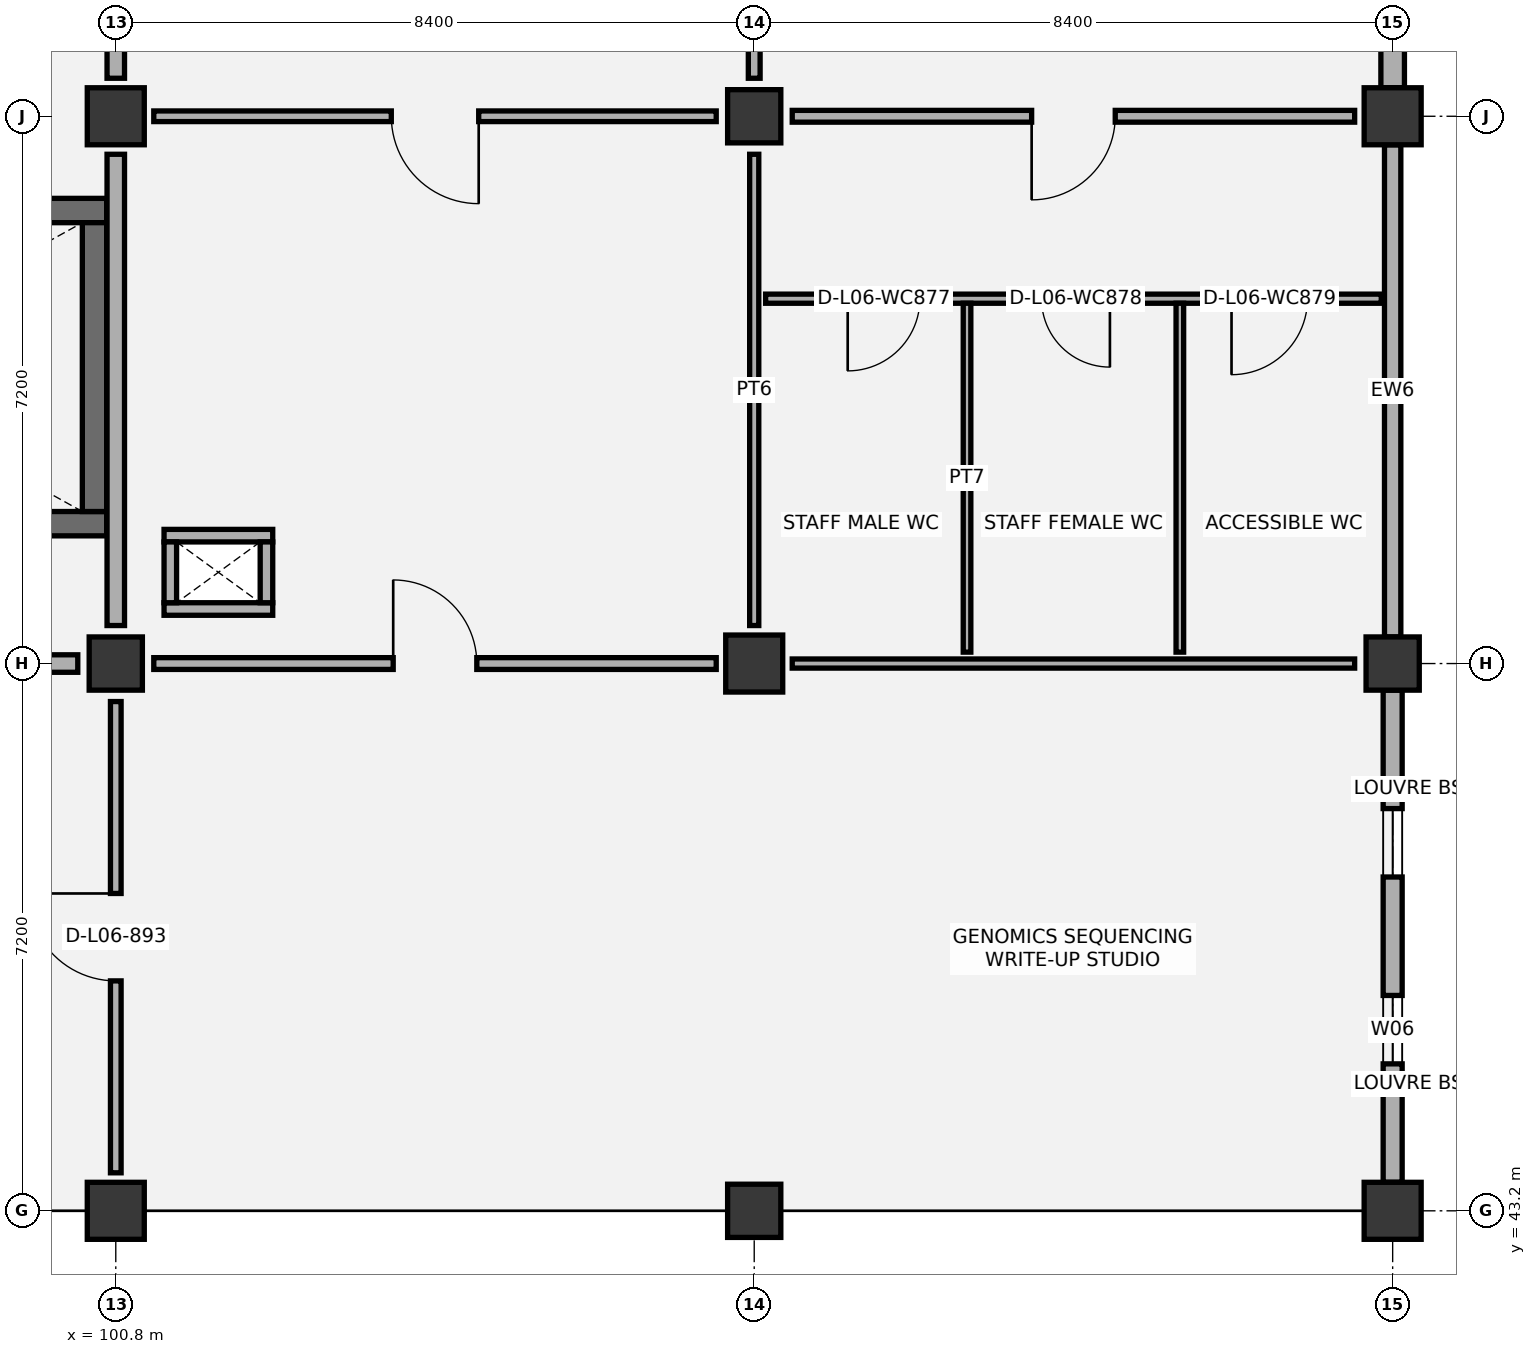
"""IFC4 building model, lengths in metres.
Left out: names, types, materials, properties, quantities, classifications, styles, units other than length and angle.
Written with IfcOpenShell. Run it as: python <this file> out.ifc"""

import sys

from ifc_helpers import new_model, si_unit, direction, frame, frame_2d, origin, origin_2d, place, context, subcontext, project, spatial, rectangle, extrude, element, fill, save


model = new_model("IFC4")
c1 = context("Model", 3, precision=1e-05, world=origin(), true_north=direction((0.0, 1.0)))
c2 = subcontext(c1, "Body", "Model", "MODEL_VIEW")
j1 = project(units=[si_unit("LENGTHUNIT", "METRE"), si_unit("PLANEANGLEUNIT", "RADIAN")], contexts=[c1])
p1 = place(None, origin())
s1 = spatial("IfcSite", under=j1, at=p1, CompositionType="ELEMENT")
p2 = place(p1, origin())
s2 = spatial("IfcBuilding", under=s1, at=p2, CompositionType="ELEMENT")
p3 = place(p2, frame((0.0, 0.0, 31.2)))
s3 = spatial("IfcBuildingStorey", under=s2, at=p3, CompositionType="ELEMENT", Elevation=31.2)
p4 = place(p3, frame((100.8, 43.2, 0.0), z_axis=(0.0, 0.0, 1.0), x_axis=(1.0, 0.0, 0.0)))
e1 = element("IfcColumn", 1, at=p4, inside=s3, PredefinedType="COLUMN", context=c2, shape_type="SweptSolid", body=[
    extrude(rectangle(XDim=0.75, YDim=0.75, at=origin_2d()), origin(), (0.0, 0.0, 1.0), 4.2),
])
p5 = place(p3, frame((100.8, 50.4, 0.0), z_axis=(0.0, 0.0, 1.0), x_axis=(1.0, 0.0, 0.0)))
e2 = element("IfcColumn", 2, at=p5, inside=s3, PredefinedType="COLUMN", context=c2, shape_type="SweptSolid", body=[
    extrude(rectangle(XDim=0.7, YDim=0.7, at=origin_2d()), origin(), (0.0, 0.0, 1.0), 4.2),
])
p6 = place(p3, frame((100.8, 57.6, 0.0), z_axis=(0.0, 0.0, 1.0), x_axis=(1.0, 0.0, 0.0)))
e3 = element("IfcColumn", 3, at=p6, inside=s3, PredefinedType="COLUMN", context=c2, shape_type="SweptSolid", body=[
    extrude(rectangle(XDim=0.75, YDim=0.75, at=origin_2d()), origin(), (0.0, 0.0, 1.0), 4.2),
])
p7 = place(p3, frame((109.2, 43.2, 0.0), z_axis=(0.0, 0.0, 1.0), x_axis=(1.0, 0.0, 0.0)))
e4 = element("IfcColumn", 4, at=p7, inside=s3, PredefinedType="COLUMN", context=c2, shape_type="SweptSolid", body=[
    extrude(rectangle(XDim=0.7, YDim=0.7, at=origin_2d()), origin(), (0.0, 0.0, 1.0), 4.2),
])
p8 = place(p3, frame((109.2, 50.4, 0.0), z_axis=(0.0, 0.0, 1.0), x_axis=(1.0, 0.0, 0.0)))
e5 = element("IfcColumn", 5, at=p8, inside=s3, PredefinedType="COLUMN", context=c2, shape_type="SweptSolid", body=[
    extrude(rectangle(XDim=0.75, YDim=0.75, at=origin_2d()), origin(), (0.0, 0.0, 1.0), 4.2),
])
p9 = place(p3, frame((109.2, 57.6, 0.0), z_axis=(0.0, 0.0, 1.0), x_axis=(1.0, 0.0, 0.0)))
e6 = element("IfcColumn", 6, at=p9, inside=s3, PredefinedType="COLUMN", context=c2, shape_type="SweptSolid", body=[
    extrude(rectangle(XDim=0.7, YDim=0.7, at=origin_2d()), origin(), (0.0, 0.0, 1.0), 4.2),
])
p10 = place(p3, frame((117.6, 43.2, 0.0), z_axis=(0.0, 0.0, 1.0), x_axis=(1.0, 0.0, 0.0)))
e7 = element("IfcColumn", 7, at=p10, inside=s3, PredefinedType="COLUMN", context=c2, shape_type="SweptSolid", body=[
    extrude(rectangle(XDim=0.75, YDim=0.75, at=origin_2d()), origin(), (0.0, 0.0, 1.0), 4.2),
])
p11 = place(p3, frame((117.6, 50.4, 0.0), z_axis=(0.0, 0.0, 1.0), x_axis=(1.0, 0.0, 0.0)))
e8 = element("IfcColumn", 8, at=p11, inside=s3, PredefinedType="COLUMN", context=c2, shape_type="SweptSolid", body=[
    extrude(rectangle(XDim=0.7, YDim=0.7, at=origin_2d()), origin(), (0.0, 0.0, 1.0), 4.2),
])
p12 = place(p3, frame((117.6, 57.6, 0.0), z_axis=(0.0, 0.0, 1.0), x_axis=(1.0, 0.0, 0.0)))
e9 = element("IfcColumn", 9, at=p12, inside=s3, PredefinedType="COLUMN", context=c2, shape_type="SweptSolid", body=[
    extrude(rectangle(XDim=0.75, YDim=0.75, at=origin_2d()), origin(), (0.0, 0.0, 1.0), 4.2),
])
p13 = place(p3, frame((93.2, 52.24, 0.0), z_axis=(0.0, 0.0, 1.0), x_axis=(1.0, 0.0, 0.0)))
e10 = element("IfcWall", 10, at=p13, inside=s3, PredefinedType="SHEAR", context=c2, shape_type="SweptSolid", body=[
    extrude(rectangle(XDim=7.48, YDim=0.32, at=frame_2d((3.74, 0.0))), origin(), (0.0, 0.0, 1.0), 3.92),
])
p14 = place(p13, frame((0.45, 0.0, 0.0)))
e11 = element("IfcOpeningElement", 11, at=p14, cuts=e10, PredefinedType="OPENING", context=c2, shape_type="SweptSolid", body=[
    extrude(rectangle(XDim=1.05, YDim=2.15, at=frame_2d((0.525, 1.075))), frame((0.0, 0.17, 0.0), z_axis=(0.0, -1.0, 0.0), x_axis=(1.0, 0.0, 0.0)), (0.0, 0.0, 1.0), 0.34),
])
p15 = place(p3, frame((93.2, 56.36, 0.0), z_axis=(0.0, 0.0, 1.0), x_axis=(1.0, 0.0, 0.0)))
e12 = element("IfcWall", 12, at=p15, inside=s3, PredefinedType="SHEAR", context=c2, shape_type="SweptSolid", body=[
    extrude(rectangle(XDim=7.48, YDim=0.32, at=frame_2d((3.74, 0.0))), origin(), (0.0, 0.0, 1.0), 3.92),
])
p16 = place(p3, frame((100.52, 52.4, 0.0), z_axis=(0.0, 0.0, 1.0), x_axis=(0.0, 1.0, 0.0)))
e13 = element("IfcWall", 13, at=p16, inside=s3, PredefinedType="SHEAR", context=c2, shape_type="SweptSolid", body=[
    extrude(rectangle(XDim=3.8, YDim=0.32, at=frame_2d((1.9, 0.0))), origin(), (0.0, 0.0, 1.0), 3.92),
])
p17 = place(p3, frame((117.6, 43.575, 0.0), z_axis=(0.0, 0.0, 1.0), x_axis=(0.0, 1.0, 0.0)))
e14 = element("IfcWall", 14, at=p17, inside=s3, PredefinedType="SOLIDWALL", context=c2, shape_type="SweptSolid", body=[
    extrude(rectangle(XDim=6.475, YDim=0.25, at=frame_2d((3.238, 0.0))), origin(), (0.0, 0.0, 1.0), 3.445),
])
p18 = place(p17, frame((1.558, 0.0, 0.9)))
e15 = element("IfcOpeningElement", 15, at=p18, cuts=e14, PredefinedType="OPENING", context=c2, shape_type="SweptSolid", body=[
    extrude(rectangle(XDim=0.9, YDim=1.8, at=frame_2d((0.45, 0.9))), frame((0.0, 0.135, 0.0), z_axis=(0.0, -1.0, 0.0), x_axis=(1.0, 0.0, 0.0)), (0.0, 0.0, 1.0), 0.27),
])
p19 = place(p17, frame((4.017, 0.0, 0.9)))
e16 = element("IfcOpeningElement", 16, at=p19, cuts=e14, PredefinedType="OPENING", context=c2, shape_type="SweptSolid", body=[
    extrude(rectangle(XDim=0.9, YDim=1.8, at=frame_2d((0.45, 0.9))), frame((0.0, 0.135, 0.0), z_axis=(0.0, -1.0, 0.0), x_axis=(1.0, 0.0, 0.0)), (0.0, 0.0, 1.0), 0.27),
])
p20 = place(p3, frame((117.6, 50.75, 0.0), z_axis=(0.0, 0.0, 1.0), x_axis=(0.0, 1.0, 0.0)))
e17 = element("IfcWall", 17, at=p20, inside=s3, PredefinedType="SOLIDWALL", context=c2, shape_type="SweptSolid", body=[
    extrude(rectangle(XDim=6.475, YDim=0.215, at=frame_2d((3.238, 0.0))), origin(), (0.0, 0.0, 1.0), 3.365),
])
p21 = place(p3, frame((117.6, 57.975, 0.0), z_axis=(0.0, 0.0, 1.0), x_axis=(0.0, 1.0, 0.0)))
e18 = element("IfcWall", 18, at=p21, inside=s3, PredefinedType="SOLIDWALL", context=c2, shape_type="SweptSolid", body=[
    extrude(rectangle(XDim=6.475, YDim=0.31, at=frame_2d((3.237, 0.0))), origin(), (0.0, 0.0, 1.0), 3.365),
])
p22 = place(p21, frame((0.858, 0.0, 0.9)))
e19 = element("IfcOpeningElement", 19, at=p22, cuts=e18, PredefinedType="OPENING", context=c2, shape_type="SweptSolid", body=[
    extrude(rectangle(XDim=1.95, YDim=1.95, at=frame_2d((0.975, 0.975))), frame((0.0, 0.165, 0.0), z_axis=(0.0, -1.0, 0.0), x_axis=(1.0, 0.0, 0.0)), (0.0, 0.0, 1.0), 0.33),
])
p23 = place(p21, frame((3.667, 0.0, 0.9)))
e20 = element("IfcOpeningElement", 20, at=p23, cuts=e18, PredefinedType="OPENING", context=c2, shape_type="SweptSolid", body=[
    extrude(rectangle(XDim=1.95, YDim=1.95, at=frame_2d((0.975, 0.975))), frame((0.0, 0.165, 0.0), z_axis=(0.0, -1.0, 0.0), x_axis=(1.0, 0.0, 0.0)), (0.0, 0.0, 1.0), 0.33),
])
for number, where, z_axis, x_axis in (
    (21, (101.435, 51.117, 0.0), (0.0, 0.0, 1.0), (1.0, 0.0, 0.0)),
    (22, (101.435, 52.083, 0.0), (0.0, 0.0, 1.0), (1.0, 0.0, 0.0)),
):
    element("IfcWall", number, at=place(p3, frame(where, z_axis=z_axis, x_axis=x_axis)), inside=s3, PredefinedType="PARTITIONING", context=c2, shape_type="SweptSolid", body=[
        extrude(rectangle(XDim=1.43, YDim=0.165, at=frame_2d((0.715, 0.0))), origin(), (0.0, 0.0, 1.0), 3.92),
    ])
for number, where, z_axis, x_axis in (
    (23, (101.518, 51.2, 0.0), (0.0, 0.0, 1.0), (0.0, 1.0, 0.0)),
    (24, (102.782, 51.2, 0.0), (0.0, 0.0, 1.0), (0.0, 1.0, 0.0)),
):
    element("IfcWall", number, at=place(p3, frame(where, z_axis=z_axis, x_axis=x_axis)), inside=s3, PredefinedType="PARTITIONING", context=c2, shape_type="SweptSolid", body=[
        extrude(rectangle(XDim=0.8, YDim=0.165, at=frame_2d((0.4, 0.0))), origin(), (0.0, 0.0, 1.0), 3.92),
    ])
p24 = place(p3, frame((109.35, 55.2, 0.0), z_axis=(0.0, 0.0, 1.0), x_axis=(1.0, 0.0, 0.0)))
e25 = element("IfcWall", 25, at=p24, inside=s3, PredefinedType="PARTITIONING", context=c2, shape_type="SweptSolid", body=[
    extrude(rectangle(XDim=8.1, YDim=0.12, at=frame_2d((4.05, 0.0))), origin(), (0.0, 0.0, 1.0), 3.92),
])
p25 = place(p24, frame((1.08, 0.0, 0.0)))
e26 = element("IfcOpeningElement", 26, at=p25, cuts=e25, PredefinedType="OPENING", context=c2, shape_type="SweptSolid", body=[
    extrude(rectangle(XDim=0.95, YDim=2.1, at=frame_2d((0.475, 1.05))), frame((0.0, 0.07, 0.0), z_axis=(0.0, -1.0, 0.0), x_axis=(1.0, 0.0, 0.0)), (0.0, 0.0, 1.0), 0.14),
])
p26 = place(p24, frame((3.63, 0.0, 0.0)))
e27 = element("IfcOpeningElement", 27, at=p26, cuts=e25, PredefinedType="OPENING", context=c2, shape_type="SweptSolid", body=[
    extrude(rectangle(XDim=0.9, YDim=2.1, at=frame_2d((0.45, 1.05))), frame((0.0, 0.07, 0.0), z_axis=(0.0, -1.0, 0.0), x_axis=(1.0, 0.0, 0.0)), (0.0, 0.0, 1.0), 0.14),
])
p27 = place(p24, frame((6.13, 0.0, 0.0)))
e28 = element("IfcOpeningElement", 28, at=p27, cuts=e25, PredefinedType="OPENING", context=c2, shape_type="SweptSolid", body=[
    extrude(rectangle(XDim=1.0, YDim=2.1, at=frame_2d((0.5, 1.05))), frame((0.0, 0.07, 0.0), z_axis=(0.0, -1.0, 0.0), x_axis=(1.0, 0.0, 0.0)), (0.0, 0.0, 1.0), 0.14),
])
for number, where, z_axis, x_axis in (
    (29, (112.0, 50.55, 0.0), (0.0, 0.0, 1.0), (0.0, 1.0, 0.0)),
    (30, (114.8, 50.55, 0.0), (0.0, 0.0, 1.0), (0.0, 1.0, 0.0)),
):
    element("IfcWall", number, at=place(p3, frame(where, z_axis=z_axis, x_axis=x_axis)), inside=s3, PredefinedType="PARTITIONING", context=c2, shape_type="SweptSolid", body=[
        extrude(rectangle(XDim=4.59, YDim=0.1, at=frame_2d((2.295, 0.0))), origin(), (0.0, 0.0, 1.0), 3.92),
    ])
p28 = place(p3, frame((100.8, 43.7, 0.0), z_axis=(0.0, 0.0, 1.0), x_axis=(0.0, 1.0, 0.0)))
e31 = element("IfcWall", 31, at=p28, inside=s3, PredefinedType="PARTITIONING", context=c2, shape_type="SweptSolid", body=[
    extrude(rectangle(XDim=6.2, YDim=0.14, at=frame_2d((3.1, 0.0))), origin(), (0.0, 0.0, 1.0), 3.515),
])
p29 = place(p28, frame((2.525, 0.0, 0.0)))
e32 = element("IfcOpeningElement", 32, at=p29, cuts=e31, PredefinedType="OPENING", context=c2, shape_type="SweptSolid", body=[
    extrude(rectangle(XDim=1.15, YDim=2.1, at=frame_2d((0.575, 1.05))), frame((0.0, 0.08, 0.0), z_axis=(0.0, -1.0, 0.0), x_axis=(1.0, 0.0, 0.0)), (0.0, 0.0, 1.0), 0.16),
])
p30 = place(p3, frame((92.9, 50.4, 0.0), z_axis=(0.0, 0.0, 1.0), x_axis=(1.0, 0.0, 0.0)))
e33 = element("IfcWall", 33, at=p30, inside=s3, PredefinedType="PARTITIONING", context=c2, shape_type="SweptSolid", body=[
    extrude(rectangle(XDim=7.4, YDim=0.23, at=frame_2d((3.7, 0.0))), origin(), (0.0, 0.0, 1.0), 3.265),
])
p31 = place(p30, frame((2.95, 0.0, 0.0)))
e34 = element("IfcOpeningElement", 34, at=p31, cuts=e33, PredefinedType="OPENING", context=c2, shape_type="SweptSolid", body=[
    extrude(rectangle(XDim=1.5, YDim=2.15, at=frame_2d((0.75, 1.075))), frame((0.0, 0.125, 0.0), z_axis=(0.0, -1.0, 0.0), x_axis=(1.0, 0.0, 0.0)), (0.0, 0.0, 1.0), 0.25),
])
p32 = place(p3, frame((100.8, 50.9, 0.0), z_axis=(0.0, 0.0, 1.0), x_axis=(0.0, 1.0, 0.0)))
e35 = element("IfcWall", 35, at=p32, inside=s3, PredefinedType="PARTITIONING", context=c2, shape_type="SweptSolid", body=[
    extrude(rectangle(XDim=6.2, YDim=0.23, at=frame_2d((3.1, 0.0))), origin(), (0.0, 0.0, 1.0), 3.315),
])
p33 = place(p3, frame((100.8, 58.1, 0.0), z_axis=(0.0, 0.0, 1.0), x_axis=(0.0, 1.0, 0.0)))
e36 = element("IfcWall", 36, at=p33, inside=s3, PredefinedType="PARTITIONING", context=c2, shape_type="SweptSolid", body=[
    extrude(rectangle(XDim=6.2, YDim=0.23, at=frame_2d((3.1, 0.0))), origin(), (0.0, 0.0, 1.0), 3.625),
])
p34 = place(p3, frame((101.3, 50.4, 0.0), z_axis=(0.0, 0.0, 1.0), x_axis=(1.0, 0.0, 0.0)))
e37 = element("IfcWall", 37, at=p34, inside=s3, PredefinedType="PARTITIONING", context=c2, shape_type="SweptSolid", body=[
    extrude(rectangle(XDim=7.4, YDim=0.155, at=frame_2d((3.7, 0.0))), origin(), (0.0, 0.0, 1.0), 3.265),
])
p35 = place(p34, frame((3.15, 0.0, 0.0)))
e38 = element("IfcOpeningElement", 38, at=p35, cuts=e37, PredefinedType="OPENING", context=c2, shape_type="SweptSolid", body=[
    extrude(rectangle(XDim=1.1, YDim=2.1, at=frame_2d((0.55, 1.05))), frame((0.0, 0.087, 0.0), z_axis=(0.0, -1.0, 0.0), x_axis=(1.0, 0.0, 0.0)), (0.0, 0.0, 1.0), 0.175),
])
p36 = place(p3, frame((109.2, 50.9, 0.0), z_axis=(0.0, 0.0, 1.0), x_axis=(0.0, 1.0, 0.0)))
e39 = element("IfcWall", 39, at=p36, inside=s3, PredefinedType="PARTITIONING", context=c2, shape_type="SweptSolid", body=[
    extrude(rectangle(XDim=6.2, YDim=0.12, at=frame_2d((3.1, 0.0))), origin(), (0.0, 0.0, 1.0), 3.625),
])
p37 = place(p3, frame((101.3, 57.6, 0.0), z_axis=(0.0, 0.0, 1.0), x_axis=(1.0, 0.0, 0.0)))
e40 = element("IfcWall", 40, at=p37, inside=s3, PredefinedType="PARTITIONING", context=c2, shape_type="SweptSolid", body=[
    extrude(rectangle(XDim=7.4, YDim=0.14, at=frame_2d((3.7, 0.0))), origin(), (0.0, 0.0, 1.0), 3.265),
])
p38 = place(p37, frame((3.125, 0.0, 0.0)))
e41 = element("IfcOpeningElement", 41, at=p38, cuts=e40, PredefinedType="OPENING", context=c2, shape_type="SweptSolid", body=[
    extrude(rectangle(XDim=1.15, YDim=2.1, at=frame_2d((0.575, 1.05))), frame((0.0, 0.08, 0.0), z_axis=(0.0, -1.0, 0.0), x_axis=(1.0, 0.0, 0.0)), (0.0, 0.0, 1.0), 0.16),
])
p39 = place(p3, frame((109.2, 58.1, 0.0), z_axis=(0.0, 0.0, 1.0), x_axis=(0.0, 1.0, 0.0)))
e42 = element("IfcWall", 42, at=p39, inside=s3, PredefinedType="PARTITIONING", context=c2, shape_type="SweptSolid", body=[
    extrude(rectangle(XDim=6.2, YDim=0.155, at=frame_2d((3.1, 0.0))), origin(), (0.0, 0.0, 1.0), 3.315),
])
p40 = place(p39, frame((2.55, 0.0, 0.0)))
e43 = element("IfcOpeningElement", 43, at=p40, cuts=e42, PredefinedType="OPENING", context=c2, shape_type="SweptSolid", body=[
    extrude(rectangle(XDim=1.1, YDim=2.1, at=frame_2d((0.55, 1.05))), frame((0.0, 0.087, 0.0), z_axis=(0.0, -1.0, 0.0), x_axis=(1.0, 0.0, 0.0)), (0.0, 0.0, 1.0), 0.175),
])
p41 = place(p3, frame((109.7, 50.4, 0.0), z_axis=(0.0, 0.0, 1.0), x_axis=(1.0, 0.0, 0.0)))
e44 = element("IfcWall", 44, at=p41, inside=s3, PredefinedType="PARTITIONING", context=c2, shape_type="SweptSolid", body=[
    extrude(rectangle(XDim=7.4, YDim=0.12, at=frame_2d((3.7, 0.0))), origin(), (0.0, 0.0, 1.0), 3.265),
])
p42 = place(p3, frame((109.7, 57.6, 0.0), z_axis=(0.0, 0.0, 1.0), x_axis=(1.0, 0.0, 0.0)))
e45 = element("IfcWall", 45, at=p42, inside=s3, PredefinedType="PARTITIONING", context=c2, shape_type="SweptSolid", body=[
    extrude(rectangle(XDim=7.4, YDim=0.155, at=frame_2d((3.7, 0.0))), origin(), (0.0, 0.0, 1.0), 3.265),
])
p43 = place(p42, frame((3.15, 0.0, 0.0)))
e46 = element("IfcOpeningElement", 46, at=p43, cuts=e45, PredefinedType="OPENING", context=c2, shape_type="SweptSolid", body=[
    extrude(rectangle(XDim=1.1, YDim=2.1, at=frame_2d((0.55, 1.05))), frame((0.0, 0.087, 0.0), z_axis=(0.0, -1.0, 0.0), x_axis=(1.0, 0.0, 0.0)), (0.0, 0.0, 1.0), 0.175),
])
p44 = place(p18, origin())
e47 = element("IfcWindow", 47, at=p44, inside=s3, PartitioningType="SINGLE_PANEL", PredefinedType="WINDOW", context=c2, shape_type="SweptSolid", body=[
    extrude(rectangle(XDim=0.9, YDim=1.8, at=frame_2d((0.45, 0.9))), frame((0.0, 0.03, 0.0), z_axis=(0.0, -1.0, 0.0), x_axis=(1.0, 0.0, 0.0)), (0.0, 0.0, 1.0), 0.06),
])
fill(e15, e47)
p45 = place(p19, origin())
e48 = element("IfcWindow", 48, at=p45, inside=s3, PartitioningType="SINGLE_PANEL", PredefinedType="WINDOW", context=c2, shape_type="SweptSolid", body=[
    extrude(rectangle(XDim=0.9, YDim=1.8, at=frame_2d((0.45, 0.9))), frame((0.0, 0.03, 0.0), z_axis=(0.0, -1.0, 0.0), x_axis=(1.0, 0.0, 0.0)), (0.0, 0.0, 1.0), 0.06),
])
fill(e16, e48)
p46 = place(p25, frame((0.95, 0.0, 0.0), z_axis=(0.0, 0.0, 1.0), x_axis=(-1.0, 0.0, 0.0)))
e49 = element("IfcDoor", 49, at=p46, inside=s3, OperationType="SINGLE_SWING_RIGHT", PredefinedType="DOOR", context=c2, shape_type="SweptSolid", body=[
    extrude(rectangle(XDim=0.95, YDim=2.1, at=frame_2d((0.475, 1.05))), frame((0.0, 0.025, 0.0), z_axis=(0.0, -1.0, 0.0), x_axis=(1.0, 0.0, 0.0)), (0.0, 0.0, 1.0), 0.05),
])
fill(e26, e49)
p47 = place(p26, frame((0.9, 0.0, 0.0), z_axis=(0.0, 0.0, 1.0), x_axis=(-1.0, 0.0, 0.0)))
e50 = element("IfcDoor", 50, at=p47, inside=s3, OperationType="SINGLE_SWING_LEFT", PredefinedType="DOOR", context=c2, shape_type="SweptSolid", body=[
    extrude(rectangle(XDim=0.9, YDim=2.1, at=frame_2d((0.45, 1.05))), frame((0.0, 0.025, 0.0), z_axis=(0.0, -1.0, 0.0), x_axis=(1.0, 0.0, 0.0)), (0.0, 0.0, 1.0), 0.05),
])
fill(e27, e50)
p48 = place(p27, frame((1.0, 0.0, 0.0), z_axis=(0.0, 0.0, 1.0), x_axis=(-1.0, 0.0, 0.0)))
e51 = element("IfcDoor", 51, at=p48, inside=s3, OperationType="SINGLE_SWING_RIGHT", PredefinedType="DOOR", context=c2, shape_type="SweptSolid", body=[
    extrude(rectangle(XDim=1.0, YDim=2.1, at=frame_2d((0.5, 1.05))), frame((0.0, 0.025, 0.0), z_axis=(0.0, -1.0, 0.0), x_axis=(1.0, 0.0, 0.0)), (0.0, 0.0, 1.0), 0.05),
])
fill(e28, e51)
p49 = place(p29, origin())
e52 = element("IfcDoor", 52, at=p49, inside=s3, OperationType="SINGLE_SWING_RIGHT", PredefinedType="DOOR", context=c2, shape_type="SweptSolid", body=[
    extrude(rectangle(XDim=1.15, YDim=2.1, at=frame_2d((0.575, 1.05))), frame((0.0, 0.025, 0.0), z_axis=(0.0, -1.0, 0.0), x_axis=(1.0, 0.0, 0.0)), (0.0, 0.0, 1.0), 0.05),
])
fill(e32, e52)
p50 = place(p35, origin())
e53 = element("IfcDoor", 53, at=p50, inside=s3, OperationType="SINGLE_SWING_LEFT", PredefinedType="DOOR", context=c2, shape_type="SweptSolid", body=[
    extrude(rectangle(XDim=1.1, YDim=2.1, at=frame_2d((0.55, 1.05))), frame((0.0, 0.025, 0.0), z_axis=(0.0, -1.0, 0.0), x_axis=(1.0, 0.0, 0.0)), (0.0, 0.0, 1.0), 0.05),
])
fill(e38, e53)
p51 = place(p38, frame((1.15, 0.0, 0.0), z_axis=(0.0, 0.0, 1.0), x_axis=(-1.0, 0.0, 0.0)))
e54 = element("IfcDoor", 54, at=p51, inside=s3, OperationType="SINGLE_SWING_LEFT", PredefinedType="DOOR", context=c2, shape_type="SweptSolid", body=[
    extrude(rectangle(XDim=1.15, YDim=2.1, at=frame_2d((0.575, 1.05))), frame((0.0, 0.025, 0.0), z_axis=(0.0, -1.0, 0.0), x_axis=(1.0, 0.0, 0.0)), (0.0, 0.0, 1.0), 0.05),
])
fill(e41, e54)
p52 = place(p43, frame((1.1, 0.0, 0.0), z_axis=(0.0, 0.0, 1.0), x_axis=(-1.0, 0.0, 0.0)))
e55 = element("IfcDoor", 55, at=p52, inside=s3, OperationType="SINGLE_SWING_RIGHT", PredefinedType="DOOR", context=c2, shape_type="SweptSolid", body=[
    extrude(rectangle(XDim=1.1, YDim=2.1, at=frame_2d((0.55, 1.05))), frame((0.0, 0.025, 0.0), z_axis=(0.0, -1.0, 0.0), x_axis=(1.0, 0.0, 0.0)), (0.0, 0.0, 1.0), 0.05),
])
fill(e46, e55)
save(model, sys.argv[1])
